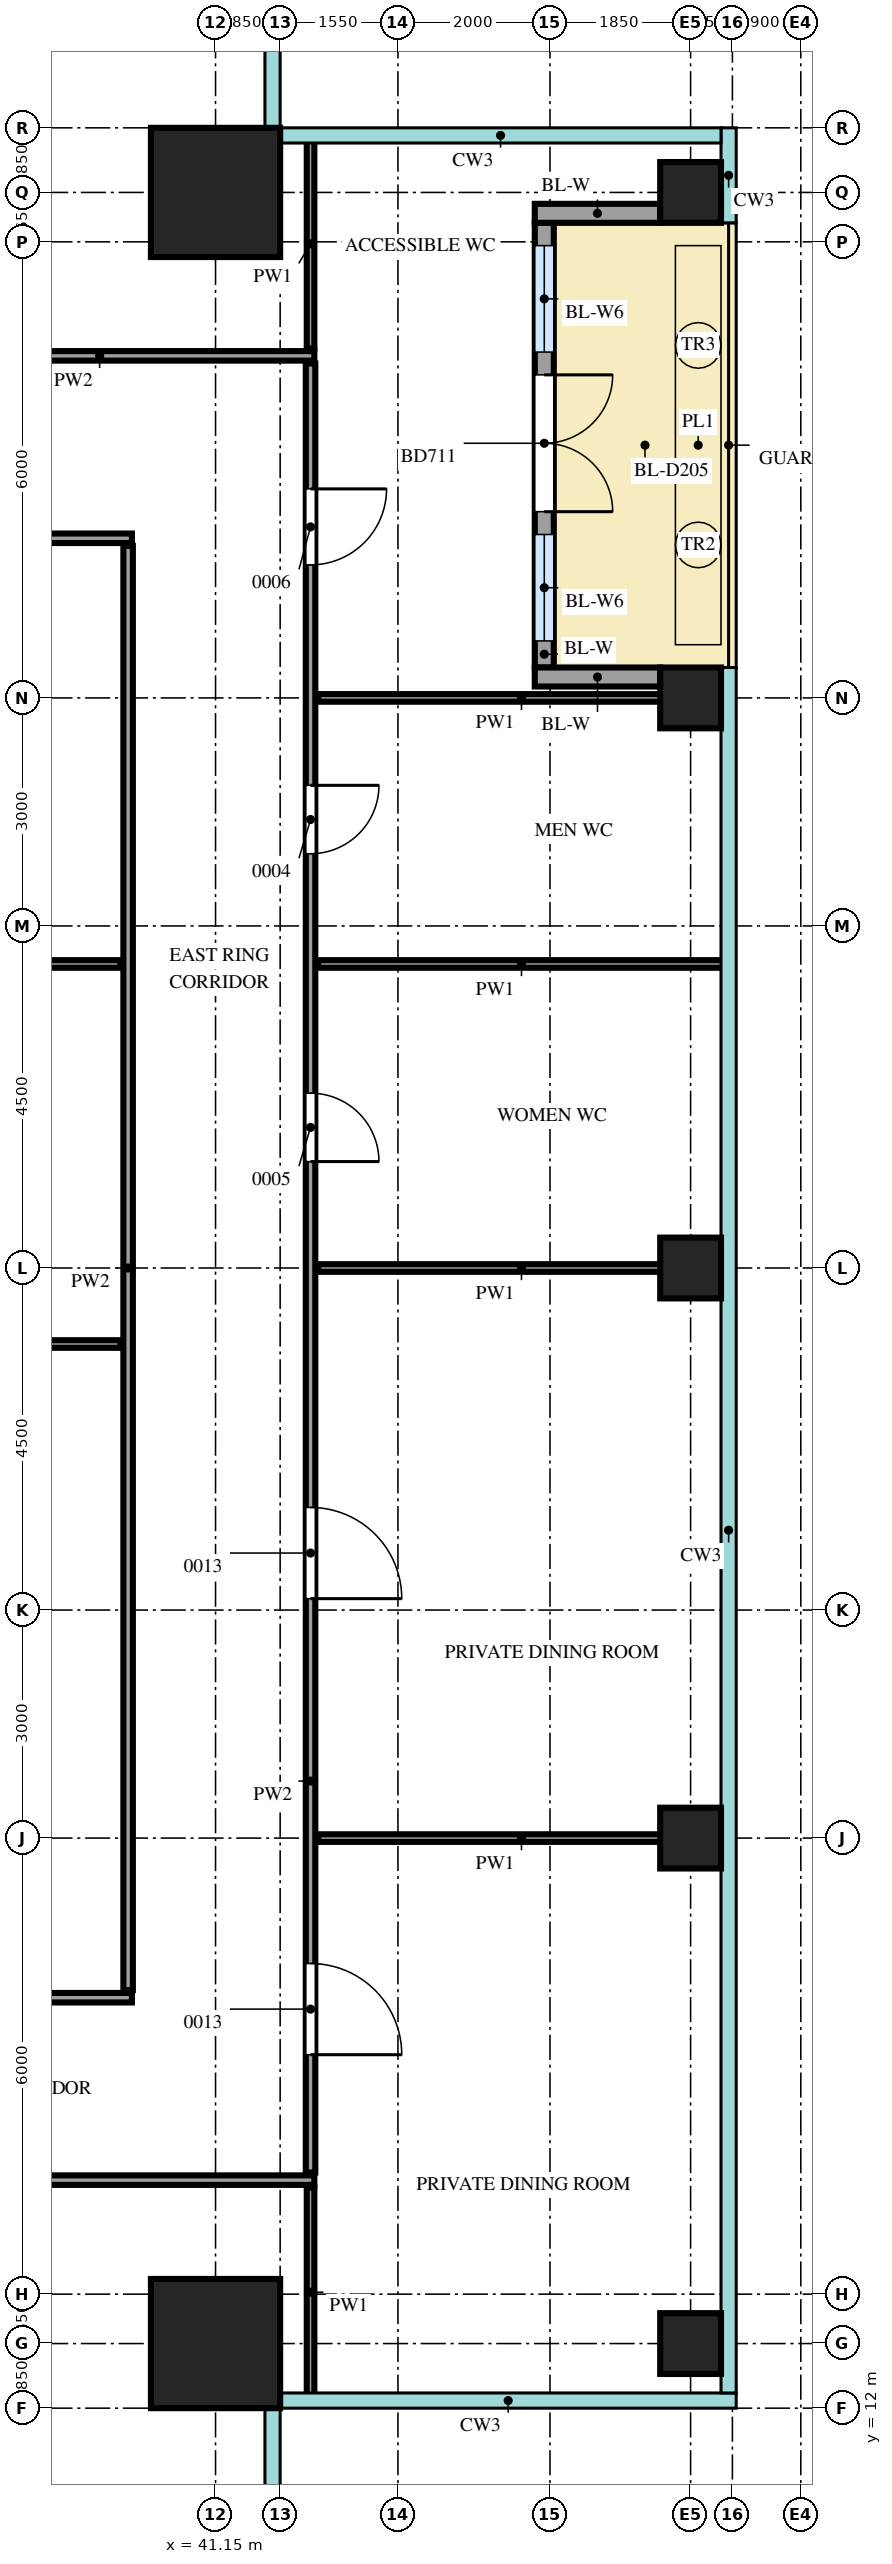
"""IFC4 building model, lengths in metres.
Left out: names, types, materials, properties, quantities, classifications, styles, units other than length and angle.
Written with IfcOpenShell. Run it as: python <this file> out.ifc"""

import sys

from ifc_helpers import new_model, si_unit, direction, frame, frame_2d, origin, origin_2d, place, context, subcontext, project, spatial, rectangle, extrude, source, transform, mapped, element, fill, save


model = new_model("IFC4")
c1 = context("Model", 3, precision=1e-05, world=origin(), true_north=direction((0.0, 1.0)))
c2 = subcontext(c1, "Body", "Model", "MODEL_VIEW")
j1 = project(units=[si_unit("LENGTHUNIT", "METRE"), si_unit("PLANEANGLEUNIT", "RADIAN")], contexts=[c1])
p1 = place(None, origin())
s1 = spatial("IfcSite", under=j1, at=p1, CompositionType="ELEMENT")
p2 = place(p1, origin())
s2 = spatial("IfcBuilding", under=s1, at=p2, CompositionType="ELEMENT")
p3 = place(p2, frame((0.0, 0.0, 314.2)))
s3 = spatial("IfcBuildingStorey", under=s2, at=p3, CompositionType="ELEMENT", Elevation=314.2)
m1 = source(origin(), c2, "Body", "SweptSolid", [
    extrude(rectangle(XDim=1.7, YDim=1.7, at=origin_2d()), origin(), (0.0, 0.0, 1.0), 3.75),
])
for number, where, z_axis, x_axis in (
    (1, (41.15, 41.15, 0.0), (0.0, 0.0, 1.0), (1.0, 0.0, 0.0)),
    (2, (41.15, 12.85, 0.0), (0.0, 0.0, 1.0), (1.0, 0.0, 0.0)),
):
    element("IfcColumn", number, at=place(p3, frame(where, z_axis=z_axis, x_axis=x_axis)), inside=s3, PredefinedType="COLUMN", context=c2, shape_type="MappedRepresentation", body=[
        mapped(m1, transform((0.0, 0.0, 0.0))),
    ])
m2 = source(origin(), c2, "Body", "SweptSolid", [
    extrude(rectangle(XDim=0.8, YDim=0.8, at=origin_2d()), origin(), (0.0, 0.0, 1.0), 3.75),
])
for number, where, z_axis, x_axis in (
    (3, (47.4, 12.85, 0.0), (0.0, 0.0, 1.0), (1.0, 0.0, 0.0)),
    (4, (47.4, 19.5, 0.0), (0.0, 0.0, 1.0), (1.0, 0.0, 0.0)),
    (5, (47.4, 27.0, 0.0), (0.0, 0.0, 1.0), (1.0, 0.0, 0.0)),
    (6, (47.4, 34.5, 0.0), (0.0, 0.0, 1.0), (1.0, 0.0, 0.0)),
    (7, (47.4, 41.15, 0.0), (0.0, 0.0, 1.0), (1.0, 0.0, 0.0)),
):
    element("IfcColumn", number, at=place(p3, frame(where, z_axis=z_axis, x_axis=x_axis)), inside=s3, PredefinedType="COLUMN", context=c2, shape_type="MappedRepresentation", body=[
        mapped(m2, transform((0.0, 0.0, 0.0))),
    ])
m3 = source(origin(), c2, "Body", "SweptSolid", [
    extrude(rectangle(XDim=5.85, YDim=0.25, at=frame_2d((2.925, 0.0))), origin(), (0.0, 0.0, 1.0), 3.75),
])
p4 = place(p3, frame((45.475, 34.9, 0.0), z_axis=(0.0, 0.0, 1.0), x_axis=(0.0, 1.0, 0.0)))
e8 = element("IfcWall", 8, at=p4, inside=s3, PredefinedType="SOLIDWALL", context=c2, shape_type="MappedRepresentation", body=[
    mapped(m3, transform((0.0, 0.0, 0.0))),
])
m4 = source(origin(), c2, "Body", "SweptSolid", [
    extrude(rectangle(XDim=1.4, YDim=2.4, at=frame_2d((0.7, 1.2))), frame((0.0, 0.135, 0.0), z_axis=(0.0, -1.0, 0.0), x_axis=(1.0, 0.0, 0.0)), (0.0, 0.0, 1.0), 0.27),
])
p5 = place(p4, frame((0.35, 0.0, 0.0)))
e9 = element("IfcOpeningElement", 9, at=p5, cuts=e8, PredefinedType="OPENING", context=c2, shape_type="MappedRepresentation", body=[
    mapped(m4, transform((0.0, 0.0, 0.0))),
])
p6 = place(p4, frame((4.15, 0.0, 0.0)))
e10 = element("IfcOpeningElement", 10, at=p6, cuts=e8, PredefinedType="OPENING", context=c2, shape_type="MappedRepresentation", body=[
    mapped(m4, transform((0.0, 0.0, 0.0))),
])
m5 = source(origin(), c2, "Body", "SweptSolid", [
    extrude(rectangle(XDim=1.8, YDim=2.4, at=frame_2d((0.9, 1.2))), frame((0.0, 0.135, 0.0), z_axis=(0.0, -1.0, 0.0), x_axis=(1.0, 0.0, 0.0)), (0.0, 0.0, 1.0), 0.27),
])
p7 = place(p4, frame((2.05, 0.0, 0.0)))
e11 = element("IfcOpeningElement", 11, at=p7, cuts=e8, PredefinedType="OPENING", context=c2, shape_type="MappedRepresentation", body=[
    mapped(m5, transform((0.0, 0.0, 0.0))),
])
m6 = source(origin(), c2, "Body", "SweptSolid", [
    extrude(rectangle(XDim=1.65, YDim=0.25, at=frame_2d((0.825, 0.0))), origin(), (0.0, 0.0, 1.0), 3.75),
])
for number, where, z_axis, x_axis in (
    (12, (47.0, 34.775, 0.0), (0.0, 0.0, 1.0), (-1.0, 0.0, 0.0)),
    (13, (47.0, 40.875, 0.0), (0.0, 0.0, 1.0), (-1.0, 0.0, 0.0)),
):
    element("IfcWall", number, at=place(p3, frame(where, z_axis=z_axis, x_axis=x_axis)), inside=s3, PredefinedType="SOLIDWALL", context=c2, shape_type="MappedRepresentation", body=[
        mapped(m6, transform((0.0, 0.0, 0.0))),
    ])
m7 = source(origin(), c2, "Body", "SweptSolid", [
    extrude(rectangle(XDim=2.75, YDim=0.1, at=frame_2d((1.375, 0.0))), origin(), (0.0, 0.0, 1.0), 3.8),
])
p8 = place(p3, frame((42.4, 12.15, 0.0), z_axis=(0.0, 0.0, 1.0), x_axis=(0.0, 1.0, 0.0)))
e14 = element("IfcWall", 14, at=p8, inside=s3, PredefinedType="PARTITIONING", context=c2, shape_type="MappedRepresentation", body=[
    mapped(m7, transform((0.0, 0.0, 0.0))),
])
m8 = source(origin(), c2, "Body", "SweptSolid", [
    extrude(rectangle(XDim=19.1, YDim=0.125, at=frame_2d((9.55, 0.0))), origin(), (0.0, 0.0, 1.0), 3.8),
])
p9 = place(p3, frame((23.35, 15.0, 0.0), z_axis=(0.0, 0.0, 1.0), x_axis=(1.0, 0.0, 0.0)))
e15 = element("IfcWall", 15, at=p9, inside=s3, PredefinedType="PARTITIONING", context=c2, shape_type="MappedRepresentation", body=[
    mapped(m8, transform((0.0, 0.0, 0.0))),
])
m9 = source(origin(), c2, "Body", "SweptSolid", [
    extrude(rectangle(XDim=1.2, YDim=2.1, at=frame_2d((0.6, 1.05))), frame((0.0, 0.073, 0.0), z_axis=(0.0, -1.0, 0.0), x_axis=(1.0, 0.0, 0.0)), (0.0, 0.0, 1.0), 0.145),
])
p10 = place(p9, frame((7.75, 0.0, 0.0)))
e16 = element("IfcOpeningElement", 16, at=p10, cuts=e15, PredefinedType="OPENING", context=c2, shape_type="MappedRepresentation", body=[
    mapped(m9, transform((0.0, 0.0, 0.0))),
])
m10 = source(origin(), c2, "Body", "SweptSolid", [
    extrude(rectangle(XDim=23.8, YDim=0.125, at=frame_2d((11.9, 0.0))), origin(), (0.0, 0.0, 1.0), 3.8),
])
p11 = place(p3, frame((42.4, 15.1, 0.0), z_axis=(0.0, 0.0, 1.0), x_axis=(0.0, 1.0, 0.0)))
e17 = element("IfcWall", 17, at=p11, inside=s3, PredefinedType="PARTITIONING", context=c2, shape_type="MappedRepresentation", body=[
    mapped(m10, transform((0.0, 0.0, 0.0))),
])
p12 = place(p11, frame((1.55, 0.0, 0.0)))
e18 = element("IfcOpeningElement", 18, at=p12, cuts=e17, PredefinedType="OPENING", context=c2, shape_type="MappedRepresentation", body=[
    mapped(m9, transform((0.0, 0.0, 0.0))),
])
p13 = place(p11, frame((7.55, 0.0, 0.0)))
e19 = element("IfcOpeningElement", 19, at=p13, cuts=e17, PredefinedType="OPENING", context=c2, shape_type="MappedRepresentation", body=[
    mapped(m9, transform((0.0, 0.0, 0.0))),
])
m11 = source(origin(), c2, "Body", "SweptSolid", [
    extrude(rectangle(XDim=0.9, YDim=2.1, at=frame_2d((0.45, 1.05))), frame((0.0, 0.073, 0.0), z_axis=(0.0, -1.0, 0.0), x_axis=(1.0, 0.0, 0.0)), (0.0, 0.0, 1.0), 0.145),
])
p14 = place(p11, frame((13.3, 0.0, 0.0)))
e20 = element("IfcOpeningElement", 20, at=p14, cuts=e17, PredefinedType="OPENING", context=c2, shape_type="MappedRepresentation", body=[
    mapped(m11, transform((0.0, 0.0, 0.0))),
])
p15 = place(p11, frame((17.35, 0.0, 0.0)))
e21 = element("IfcOpeningElement", 21, at=p15, cuts=e17, PredefinedType="OPENING", context=c2, shape_type="MappedRepresentation", body=[
    mapped(m11, transform((0.0, 0.0, 0.0))),
])
m12 = source(origin(), c2, "Body", "SweptSolid", [
    extrude(rectangle(XDim=1.0, YDim=2.1, at=frame_2d((0.5, 1.05))), frame((0.0, 0.073, 0.0), z_axis=(0.0, -1.0, 0.0), x_axis=(1.0, 0.0, 0.0)), (0.0, 0.0, 1.0), 0.145),
])
p16 = place(p11, frame((21.15, 0.0, 0.0)))
e22 = element("IfcOpeningElement", 22, at=p16, cuts=e17, PredefinedType="OPENING", context=c2, shape_type="MappedRepresentation", body=[
    mapped(m12, transform((0.0, 0.0, 0.0))),
])
m13 = source(origin(), c2, "Body", "SweptSolid", [
    extrude(rectangle(XDim=16.7, YDim=0.125, at=frame_2d((8.35, 0.0))), origin(), (0.0, 0.0, 1.0), 3.8),
])
p17 = place(p3, frame((23.35, 17.4, 0.0), z_axis=(0.0, 0.0, 1.0), x_axis=(1.0, 0.0, 0.0)))
e23 = element("IfcWall", 23, at=p17, inside=s3, PredefinedType="PARTITIONING", context=c2, shape_type="MappedRepresentation", body=[
    mapped(m13, transform((0.0, 0.0, 0.0))),
])
p18 = place(p17, frame((7.75, 0.0, 0.0)))
e24 = element("IfcOpeningElement", 24, at=p18, cuts=e23, PredefinedType="OPENING", context=c2, shape_type="MappedRepresentation", body=[
    mapped(m9, transform((0.0, 0.0, 0.0))),
])
m14 = source(origin(), c2, "Body", "SweptSolid", [
    extrude(rectangle(XDim=19.0, YDim=0.125, at=frame_2d((9.5, 0.0))), origin(), (0.0, 0.0, 1.0), 3.8),
])
p19 = place(p3, frame((40.0, 17.5, 0.0), z_axis=(0.0, 0.0, 1.0), x_axis=(0.0, 1.0, 0.0)))
e25 = element("IfcWall", 25, at=p19, inside=s3, PredefinedType="PARTITIONING", context=c2, shape_type="MappedRepresentation", body=[
    mapped(m14, transform((0.0, 0.0, 0.0))),
])
m15 = source(origin(), c2, "Body", "SweptSolid", [
    extrude(rectangle(XDim=5.35, YDim=0.1, at=frame_2d((2.675, 0.0))), origin(), (0.0, 0.0, 1.0), 3.8),
])
p20 = place(p3, frame((42.5, 19.5, 0.0), z_axis=(0.0, 0.0, 1.0), x_axis=(1.0, 0.0, 0.0)))
e26 = element("IfcWall", 26, at=p20, inside=s3, PredefinedType="PARTITIONING", context=c2, shape_type="MappedRepresentation", body=[
    mapped(m15, transform((0.0, 0.0, 0.0))),
])
m16 = source(origin(), c2, "Body", "SweptSolid", [
    extrude(rectangle(XDim=16.4, YDim=0.1, at=frame_2d((8.2, 0.0))), origin(), (0.0, 0.0, 1.0), 3.8),
])
p21 = place(p3, frame((23.5, 26.0, 0.0), z_axis=(0.0, 0.0, 1.0), x_axis=(1.0, 0.0, 0.0)))
e27 = element("IfcWall", 27, at=p21, inside=s3, PredefinedType="PARTITIONING", context=c2, shape_type="MappedRepresentation", body=[
    mapped(m16, transform((0.0, 0.0, 0.0))),
])
p22 = place(p3, frame((42.5, 27.0, 0.0), z_axis=(0.0, 0.0, 1.0), x_axis=(1.0, 0.0, 0.0)))
e28 = element("IfcWall", 28, at=p22, inside=s3, PredefinedType="PARTITIONING", context=c2, shape_type="MappedRepresentation", body=[
    mapped(m15, transform((0.0, 0.0, 0.0))),
])
p23 = place(p3, frame((23.5, 31.0, 0.0), z_axis=(0.0, 0.0, 1.0), x_axis=(1.0, 0.0, 0.0)))
e29 = element("IfcWall", 29, at=p23, inside=s3, PredefinedType="PARTITIONING", context=c2, shape_type="MappedRepresentation", body=[
    mapped(m16, transform((0.0, 0.0, 0.0))),
])
for number, where, z_axis, x_axis in (
    (30, (42.5, 31.0, 0.0), (0.0, 0.0, 1.0), (1.0, 0.0, 0.0)),
    (31, (42.5, 34.5, 0.0), (0.0, 0.0, 1.0), (1.0, 0.0, 0.0)),
):
    element("IfcWall", number, at=place(p3, frame(where, z_axis=z_axis, x_axis=x_axis)), inside=s3, PredefinedType="PARTITIONING", context=c2, shape_type="MappedRepresentation", body=[
        mapped(m15, transform((0.0, 0.0, 0.0))),
    ])
p24 = place(p3, frame((23.35, 36.6, 0.0), z_axis=(0.0, 0.0, 1.0), x_axis=(1.0, 0.0, 0.0)))
e32 = element("IfcWall", 32, at=p24, inside=s3, PredefinedType="PARTITIONING", context=c2, shape_type="MappedRepresentation", body=[
    mapped(m13, transform((0.0, 0.0, 0.0))),
])
p25 = place(p24, frame((8.05, 0.0, 0.0)))
e33 = element("IfcOpeningElement", 33, at=p25, cuts=e32, PredefinedType="OPENING", context=c2, shape_type="MappedRepresentation", body=[
    mapped(m11, transform((0.0, 0.0, 0.0))),
])
m17 = source(origin(), c2, "Body", "SweptSolid", [
    extrude(rectangle(XDim=12.1, YDim=0.125, at=frame_2d((6.05, 0.0))), origin(), (0.0, 0.0, 1.0), 3.8),
])
p26 = place(p3, frame((30.35, 39.0, 0.0), z_axis=(0.0, 0.0, 1.0), x_axis=(1.0, 0.0, 0.0)))
e34 = element("IfcWall", 34, at=p26, inside=s3, PredefinedType="PARTITIONING", context=c2, shape_type="MappedRepresentation", body=[
    mapped(m17, transform((0.0, 0.0, 0.0))),
])
p27 = place(p26, frame((5.25, 0.0, 0.0)))
e35 = element("IfcOpeningElement", 35, at=p27, cuts=e34, PredefinedType="OPENING", context=c2, shape_type="MappedRepresentation", body=[
    mapped(m9, transform((0.0, 0.0, 0.0))),
])
p28 = place(p3, frame((42.4, 39.1, 0.0), z_axis=(0.0, 0.0, 1.0), x_axis=(0.0, 1.0, 0.0)))
e36 = element("IfcWall", 36, at=p28, inside=s3, PredefinedType="PARTITIONING", context=c2, shape_type="MappedRepresentation", body=[
    mapped(m7, transform((0.0, 0.0, 0.0))),
])
m18 = source(origin(), c2, "Body", "SweptSolid", [
    extrude(rectangle(XDim=1.4, YDim=2.4, at=frame_2d((0.7, 1.2))), frame((0.0, 0.03, 0.0), z_axis=(0.0, -1.0, 0.0), x_axis=(1.0, 0.0, 0.0)), (0.0, 0.0, 1.0), 0.06),
])
p29 = place(p5, origin())
e37 = element("IfcWindow", 37, at=p29, inside=s3, PartitioningType="SINGLE_PANEL", PredefinedType="WINDOW", context=c2, shape_type="MappedRepresentation", body=[
    mapped(m18, transform((0.0, 0.0, 0.0))),
])
fill(e9, e37)
p30 = place(p6, origin())
e38 = element("IfcWindow", 38, at=p30, inside=s3, PartitioningType="SINGLE_PANEL", PredefinedType="WINDOW", context=c2, shape_type="MappedRepresentation", body=[
    mapped(m18, transform((0.0, 0.0, 0.0))),
])
fill(e10, e38)
m19 = source(origin(), c2, "Body", "SweptSolid", [
    extrude(rectangle(XDim=1.8, YDim=2.4, at=frame_2d((0.9, 1.2))), frame((0.0, 0.025, 0.0), z_axis=(0.0, -1.0, 0.0), x_axis=(1.0, 0.0, 0.0)), (0.0, 0.0, 1.0), 0.05),
])
p31 = place(p7, origin())
e39 = element("IfcDoor", 39, at=p31, inside=s3, OperationType="DOUBLE_DOOR_DOUBLE_SWING", PredefinedType="DOOR", context=c2, shape_type="MappedRepresentation", body=[
    mapped(m19, transform((0.0, 0.0, 0.0))),
])
fill(e11, e39)
m20 = source(origin(), c2, "Body", "SweptSolid", [
    extrude(rectangle(XDim=1.2, YDim=2.1, at=frame_2d((0.6, 1.05))), frame((0.0, 0.025, 0.0), z_axis=(0.0, -1.0, 0.0), x_axis=(1.0, 0.0, 0.0)), (0.0, 0.0, 1.0), 0.05),
])
p32 = place(p12, origin())
e40 = element("IfcDoor", 40, at=p32, inside=s3, OperationType="SINGLE_SWING_LEFT", PredefinedType="DOOR", context=c2, shape_type="MappedRepresentation", body=[
    mapped(m20, transform((0.0, 0.0, 0.0))),
])
fill(e18, e40)
p33 = place(p13, origin())
e41 = element("IfcDoor", 41, at=p33, inside=s3, OperationType="SINGLE_SWING_LEFT", PredefinedType="DOOR", context=c2, shape_type="MappedRepresentation", body=[
    mapped(m20, transform((0.0, 0.0, 0.0))),
])
fill(e19, e41)
m21 = source(origin(), c2, "Body", "SweptSolid", [
    extrude(rectangle(XDim=0.9, YDim=2.1, at=frame_2d((0.45, 1.05))), frame((0.0, 0.025, 0.0), z_axis=(0.0, -1.0, 0.0), x_axis=(1.0, 0.0, 0.0)), (0.0, 0.0, 1.0), 0.05),
])
p34 = place(p14, origin())
e42 = element("IfcDoor", 42, at=p34, inside=s3, OperationType="SINGLE_SWING_LEFT", PredefinedType="DOOR", context=c2, shape_type="MappedRepresentation", body=[
    mapped(m21, transform((0.0, 0.0, 0.0))),
])
fill(e20, e42)
p35 = place(p15, origin())
e43 = element("IfcDoor", 43, at=p35, inside=s3, OperationType="SINGLE_SWING_RIGHT", PredefinedType="DOOR", context=c2, shape_type="MappedRepresentation", body=[
    mapped(m21, transform((0.0, 0.0, 0.0))),
])
fill(e21, e43)
m22 = source(origin(), c2, "Body", "SweptSolid", [
    extrude(rectangle(XDim=1.0, YDim=2.1, at=frame_2d((0.5, 1.05))), frame((0.0, 0.025, 0.0), z_axis=(0.0, -1.0, 0.0), x_axis=(1.0, 0.0, 0.0)), (0.0, 0.0, 1.0), 0.05),
])
p36 = place(p16, origin())
e44 = element("IfcDoor", 44, at=p36, inside=s3, OperationType="SINGLE_SWING_RIGHT", PredefinedType="DOOR", context=c2, shape_type="MappedRepresentation", body=[
    mapped(m22, transform((0.0, 0.0, 0.0))),
])
fill(e22, e44)
save(model, sys.argv[1])
